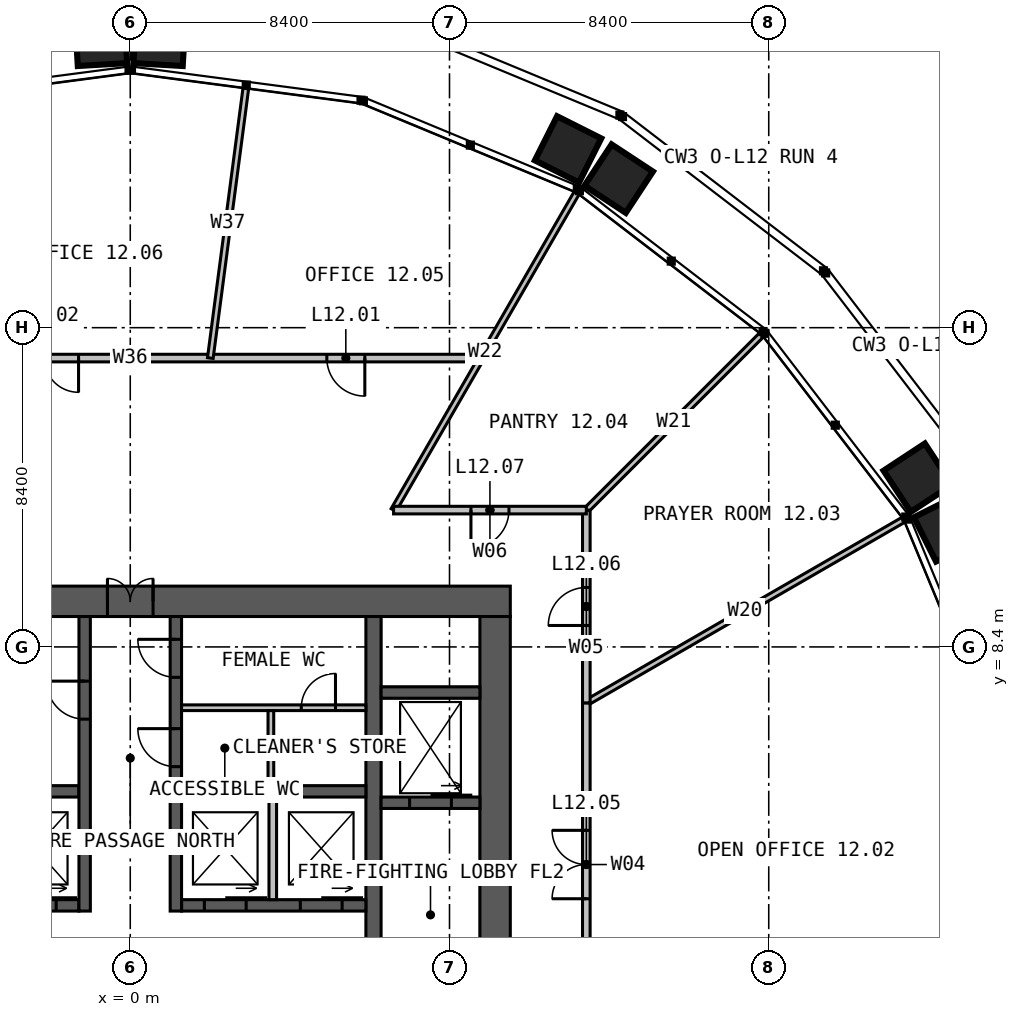
"""IFC4 building model, lengths in metres.
Left out: names, types, materials, properties, quantities, classifications, styles, units other than length and angle.
Written with IfcOpenShell. Run it as: python <this file> out.ifc"""

import sys

from ifc_helpers import new_model, si_unit, direction, frame, frame_2d, origin, place, context, subcontext, project, spatial, rectangle, extrude, element, fill, save


model = new_model("IFC4")
c1 = context("Model", 3, precision=1e-05, world=origin(), true_north=direction((0.0, 1.0)))
c2 = subcontext(c1, "Body", "Model", "MODEL_VIEW")
j1 = project(units=[si_unit("LENGTHUNIT", "METRE"), si_unit("PLANEANGLEUNIT", "RADIAN")], contexts=[c1])
p1 = place(None, origin())
s1 = spatial("IfcSite", under=j1, at=p1, CompositionType="ELEMENT")
p2 = place(p1, origin())
s2 = spatial("IfcBuilding", under=s1, at=p2, CompositionType="ELEMENT")
p3 = place(p2, frame((0.0, 0.0, 53.0)))
s3 = spatial("IfcBuildingStorey", under=s2, at=p3, CompositionType="ELEMENT", Elevation=53.0)
p4 = place(p3, frame((-10.0, 9.6, 0.0), z_axis=(0.0, 0.0, 1.0), x_axis=(1.0, 0.0, 0.0)))
e1 = element("IfcWall", 1, at=p4, inside=s3, PredefinedType="SOLIDWALL", context=c2, shape_type="SweptSolid", body=[
    extrude(rectangle(XDim=20.0, YDim=0.8, at=frame_2d((10.0, 0.0))), origin(), (0.0, 0.0, 1.0), 4.0),
])
p5 = place(p4, frame((9.4, 0.0, 0.0)))
e2 = element("IfcOpeningElement", 2, at=p5, cuts=e1, PredefinedType="OPENING", context=c2, shape_type="SweptSolid", body=[
    extrude(rectangle(XDim=1.2, YDim=2.2, at=frame_2d((0.6, 1.1))), frame((0.0, 0.41, 0.0), z_axis=(0.0, -1.0, 0.0), x_axis=(1.0, 0.0, 0.0)), (0.0, 0.0, 1.0), 0.82),
])
p6 = place(p3, frame((9.6, -9.2, 0.0), z_axis=(0.0, 0.0, 1.0), x_axis=(0.0, 1.0, 0.0)))
e3 = element("IfcWall", 3, at=p6, inside=s3, PredefinedType="SOLIDWALL", context=c2, shape_type="SweptSolid", body=[
    extrude(rectangle(XDim=18.4, YDim=0.8, at=frame_2d((9.2, 0.0))), origin(), (0.0, 0.0, 1.0), 4.0),
])
p7 = place(p3, frame((6.4, 9.2, 0.0), z_axis=(0.0, 0.0, 1.0), x_axis=(0.0, -1.0, 0.0)))
e4 = element("IfcWall", 4, at=p7, inside=s3, PredefinedType="SOLIDWALL", context=c2, shape_type="SweptSolid", body=[
    extrude(rectangle(XDim=18.4, YDim=0.4, at=frame_2d((9.2, 0.0))), origin(), (0.0, 0.0, 1.0), 4.0),
])
p8 = place(p7, frame((8.7, 0.0, 0.0)))
e5 = element("IfcOpeningElement", 5, at=p8, cuts=e4, PredefinedType="OPENING", context=c2, shape_type="SweptSolid", body=[
    extrude(rectangle(XDim=1.0, YDim=2.2, at=frame_2d((0.5, 1.1))), frame((0.0, 0.21, 0.0), z_axis=(0.0, -1.0, 0.0), x_axis=(1.0, 0.0, 0.0)), (0.0, 0.0, 1.0), 0.42),
])
p9 = place(p3, frame((-6.2, 1.6, 0.0), z_axis=(0.0, 0.0, 1.0), x_axis=(1.0, 0.0, 0.0)))
e6 = element("IfcWall", 6, at=p9, inside=s3, PredefinedType="SOLIDWALL", context=c2, shape_type="SweptSolid", body=[
    extrude(rectangle(XDim=4.85, YDim=0.3, at=frame_2d((2.425, 0.0))), origin(), (0.0, 0.0, 1.0), 4.0),
])
p10 = place(p9, frame((0.625, 0.0, 0.0)))
e7 = element("IfcOpeningElement", 7, at=p10, cuts=e6, PredefinedType="OPENING", context=c2, shape_type="SweptSolid", body=[
    extrude(rectangle(XDim=1.1, YDim=2.2, at=frame_2d((0.55, 1.1))), frame((0.0, 0.16, 0.0), z_axis=(0.0, -1.0, 0.0), x_axis=(1.0, 0.0, 0.0)), (0.0, 0.0, 1.0), 0.32),
])
p11 = place(p9, frame((3.15, 0.0, 0.0)))
e8 = element("IfcOpeningElement", 8, at=p11, cuts=e6, PredefinedType="OPENING", context=c2, shape_type="SweptSolid", body=[
    extrude(rectangle(XDim=1.1, YDim=2.2, at=frame_2d((0.55, 1.1))), frame((0.0, 0.16, 0.0), z_axis=(0.0, -1.0, 0.0), x_axis=(1.0, 0.0, 0.0)), (0.0, 0.0, 1.0), 0.32),
])
p12 = place(p3, frame((1.35, 1.6, 0.0), z_axis=(0.0, 0.0, 1.0), x_axis=(1.0, 0.0, 0.0)))
e9 = element("IfcWall", 9, at=p12, inside=s3, PredefinedType="SOLIDWALL", context=c2, shape_type="SweptSolid", body=[
    extrude(rectangle(XDim=4.85, YDim=0.3, at=frame_2d((2.425, 0.0))), origin(), (0.0, 0.0, 1.0), 4.0),
])
p13 = place(p12, frame((0.6, 0.0, 0.0)))
e10 = element("IfcOpeningElement", 10, at=p13, cuts=e9, PredefinedType="OPENING", context=c2, shape_type="SweptSolid", body=[
    extrude(rectangle(XDim=1.1, YDim=2.2, at=frame_2d((0.55, 1.1))), frame((0.0, 0.16, 0.0), z_axis=(0.0, -1.0, 0.0), x_axis=(1.0, 0.0, 0.0)), (0.0, 0.0, 1.0), 0.32),
])
p14 = place(p12, frame((3.125, 0.0, 0.0)))
e11 = element("IfcOpeningElement", 11, at=p14, cuts=e9, PredefinedType="OPENING", context=c2, shape_type="SweptSolid", body=[
    extrude(rectangle(XDim=1.1, YDim=2.2, at=frame_2d((0.55, 1.1))), frame((0.0, 0.16, 0.0), z_axis=(0.0, -1.0, 0.0), x_axis=(1.0, 0.0, 0.0)), (0.0, 0.0, 1.0), 0.32),
])
for number, where, z_axis, x_axis in (
    (12, (-6.2, 4.6, 0.0), (0.0, 0.0, 1.0), (1.0, 0.0, 0.0)),
    (13, (1.35, 4.6, 0.0), (0.0, 0.0, 1.0), (1.0, 0.0, 0.0)),
):
    element("IfcWall", number, at=place(p3, frame(where, z_axis=z_axis, x_axis=x_axis)), inside=s3, PredefinedType="SOLIDWALL", context=c2, shape_type="SweptSolid", body=[
        extrude(rectangle(XDim=4.85, YDim=0.3, at=frame_2d((2.425, 0.0))), origin(), (0.0, 0.0, 1.0), 4.0),
    ])
p15 = place(p3, frame((-1.2, 1.45, 0.0), z_axis=(0.0, 0.0, 1.0), x_axis=(0.0, 1.0, 0.0)))
e14 = element("IfcWall", 14, at=p15, inside=s3, PredefinedType="SOLIDWALL", context=c2, shape_type="SweptSolid", body=[
    extrude(rectangle(XDim=7.75, YDim=0.3, at=frame_2d((3.875, 0.0))), origin(), (0.0, 0.0, 1.0), 4.0),
])
p16 = place(p15, frame((5.05, 0.0, 0.0)))
e15 = element("IfcOpeningElement", 15, at=p16, cuts=e14, PredefinedType="OPENING", context=c2, shape_type="SweptSolid", body=[
    extrude(rectangle(XDim=1.0, YDim=2.2, at=frame_2d((0.5, 1.1))), frame((0.0, 0.16, 0.0), z_axis=(0.0, -1.0, 0.0), x_axis=(1.0, 0.0, 0.0)), (0.0, 0.0, 1.0), 0.32),
])
p17 = place(p3, frame((1.2, 1.45, 0.0), z_axis=(0.0, 0.0, 1.0), x_axis=(0.0, 1.0, 0.0)))
e16 = element("IfcWall", 16, at=p17, inside=s3, PredefinedType="SOLIDWALL", context=c2, shape_type="SweptSolid", body=[
    extrude(rectangle(XDim=7.75, YDim=0.3, at=frame_2d((3.875, 0.0))), origin(), (0.0, 0.0, 1.0), 4.0),
])
p18 = place(p17, frame((3.8, 0.0, 0.0)))
e17 = element("IfcOpeningElement", 17, at=p18, cuts=e16, PredefinedType="OPENING", context=c2, shape_type="SweptSolid", body=[
    extrude(rectangle(XDim=1.0, YDim=2.2, at=frame_2d((0.5, 1.1))), frame((0.0, 0.16, 0.0), z_axis=(0.0, -1.0, 0.0), x_axis=(1.0, 0.0, 0.0)), (0.0, 0.0, 1.0), 0.32),
])
p19 = place(p17, frame((6.15, 0.0, 0.0)))
e18 = element("IfcOpeningElement", 18, at=p19, cuts=e16, PredefinedType="OPENING", context=c2, shape_type="SweptSolid", body=[
    extrude(rectangle(XDim=1.0, YDim=2.2, at=frame_2d((0.5, 1.1))), frame((0.0, 0.16, 0.0), z_axis=(0.0, -1.0, 0.0), x_axis=(1.0, 0.0, 0.0)), (0.0, 0.0, 1.0), 0.32),
])
p20 = place(p3, frame((6.6, 4.3, 0.0), z_axis=(0.0, 0.0, 1.0), x_axis=(1.0, 0.0, 0.0)))
e19 = element("IfcWall", 19, at=p20, inside=s3, PredefinedType="SOLIDWALL", context=c2, shape_type="SweptSolid", body=[
    extrude(rectangle(XDim=2.6, YDim=0.3, at=frame_2d((1.3, 0.0))), origin(), (0.0, 0.0, 1.0), 4.0),
])
p21 = place(p20, frame((0.75, 0.0, 0.0)))
e20 = element("IfcOpeningElement", 20, at=p21, cuts=e19, PredefinedType="OPENING", context=c2, shape_type="SweptSolid", body=[
    extrude(rectangle(XDim=1.1, YDim=2.2, at=frame_2d((0.55, 1.1))), frame((0.0, 0.16, 0.0), z_axis=(0.0, -1.0, 0.0), x_axis=(1.0, 0.0, 0.0)), (0.0, 0.0, 1.0), 0.32),
])
p22 = place(p3, frame((6.6, 7.2, 0.0), z_axis=(0.0, 0.0, 1.0), x_axis=(1.0, 0.0, 0.0)))
e21 = element("IfcWall", 21, at=p22, inside=s3, PredefinedType="SOLIDWALL", context=c2, shape_type="SweptSolid", body=[
    extrude(rectangle(XDim=2.6, YDim=0.3, at=frame_2d((1.3, 0.0))), origin(), (0.0, 0.0, 1.0), 4.0),
])
p23 = place(p3, frame((3.75, 1.75, 0.0), z_axis=(0.0, 0.0, 1.0), x_axis=(0.0, 1.0, 0.0)))
e22 = element("IfcWall", 22, at=p23, inside=s3, PredefinedType="SOLIDWALL", context=c2, shape_type="SweptSolid", body=[
    extrude(rectangle(XDim=2.7, YDim=0.2, at=frame_2d((1.35, 0.0))), origin(), (0.0, 0.0, 1.0), 3.75),
])
p24 = place(p3, frame((1.35, 6.8, 0.0), z_axis=(0.0, 0.0, 1.0), x_axis=(1.0, 0.0, 0.0)))
e23 = element("IfcWall", 23, at=p24, inside=s3, PredefinedType="PARTITIONING", context=c2, shape_type="SweptSolid", body=[
    extrude(rectangle(XDim=4.85, YDim=0.15, at=frame_2d((2.425, 0.0))), origin(), (0.0, 0.0, 1.0), 3.75),
])
p25 = place(p24, frame((3.15, 0.0, 0.0)))
e24 = element("IfcOpeningElement", 24, at=p25, cuts=e23, PredefinedType="OPENING", context=c2, shape_type="SweptSolid", body=[
    extrude(rectangle(XDim=0.9, YDim=2.2, at=frame_2d((0.45, 1.1))), frame((0.0, 0.085, 0.0), z_axis=(0.0, -1.0, 0.0), x_axis=(1.0, 0.0, 0.0)), (0.0, 0.0, 1.0), 0.17),
])
p26 = place(p3, frame((3.7, 4.75, 0.0), z_axis=(0.0, 0.0, 1.0), x_axis=(0.0, 1.0, 0.0)))
e25 = element("IfcWall", 25, at=p26, inside=s3, PredefinedType="PARTITIONING", context=c2, shape_type="SweptSolid", body=[
    extrude(rectangle(XDim=1.975, YDim=0.15, at=frame_2d((0.988, 0.0))), origin(), (0.0, 0.0, 1.0), 3.75),
])
p27 = place(p3, frame((12.0, 6.928, 0.0), z_axis=(0.0, 0.0, 1.0), x_axis=(0.866030350715, 0.499991431567, 0.0)))
e26 = element("IfcWall", 26, at=p27, inside=s3, PredefinedType="PARTITIONING", context=c2, shape_type="SweptSolid", body=[
    extrude(rectangle(XDim=9.638, YDim=0.15, at=frame_2d((4.819, 0.0))), origin(), (0.0, 0.0, 1.0), 2.79),
])
p28 = place(p3, frame((12.0, 12.0, 0.0), z_axis=(0.0, 0.0, 1.0), x_axis=(0.707106781187, 0.707106781187, 0.0)))
e27 = element("IfcWall", 27, at=p28, inside=s3, PredefinedType="PARTITIONING", context=c2, shape_type="SweptSolid", body=[
    extrude(rectangle(XDim=6.524, YDim=0.15, at=frame_2d((3.262, 0.0))), origin(), (0.0, 0.0, 1.0), 2.79),
])
p29 = place(p3, frame((6.928, 12.0, 0.0), z_axis=(0.0, 0.0, 1.0), x_axis=(0.499991431567, 0.866030350715, 0.0)))
e28 = element("IfcWall", 28, at=p29, inside=s3, PredefinedType="PARTITIONING", context=c2, shape_type="SweptSolid", body=[
    extrude(rectangle(XDim=9.638, YDim=0.15, at=frame_2d((4.819, 0.0))), origin(), (0.0, 0.0, 1.0), 2.79),
])
p30 = place(p3, frame((12.0, -1.58, 0.0), z_axis=(0.0, 0.0, 1.0), x_axis=(0.0, 1.0, 0.0)))
e29 = element("IfcWall", 29, at=p30, inside=s3, PredefinedType="PARTITIONING", context=c2, shape_type="SweptSolid", body=[
    extrude(rectangle(XDim=8.508, YDim=0.2, at=frame_2d((4.254, 0.0))), origin(), (0.0, 0.0, 1.0), 3.8),
])
p31 = place(p30, frame((3.354, 0.0, 0.0)))
e30 = element("IfcOpeningElement", 30, at=p31, cuts=e29, PredefinedType="OPENING", context=c2, shape_type="SweptSolid", body=[
    extrude(rectangle(XDim=1.8, YDim=2.2, at=frame_2d((0.9, 1.1))), frame((0.0, 0.11, 0.0), z_axis=(0.0, -1.0, 0.0), x_axis=(1.0, 0.0, 0.0)), (0.0, 0.0, 1.0), 0.22),
])
p32 = place(p3, frame((12.0, 6.928, 0.0), z_axis=(0.0, 0.0, 1.0), x_axis=(0.0, 1.0, 0.0)))
e31 = element("IfcWall", 31, at=p32, inside=s3, PredefinedType="PARTITIONING", context=c2, shape_type="SweptSolid", body=[
    extrude(rectangle(XDim=5.072, YDim=0.2, at=frame_2d((2.536, 0.0))), origin(), (0.0, 0.0, 1.0), 3.8),
])
p33 = place(p32, frame((2.036, 0.0, 0.0)))
e32 = element("IfcOpeningElement", 32, at=p33, cuts=e31, PredefinedType="OPENING", context=c2, shape_type="SweptSolid", body=[
    extrude(rectangle(XDim=1.0, YDim=2.2, at=frame_2d((0.5, 1.1))), frame((0.0, 0.11, 0.0), z_axis=(0.0, -1.0, 0.0), x_axis=(1.0, 0.0, 0.0)), (0.0, 0.0, 1.0), 0.22),
])
p34 = place(p3, frame((12.0, 12.0, 0.0), z_axis=(0.0, 0.0, 1.0), x_axis=(-1.0, 0.0, 0.0)))
e33 = element("IfcWall", 33, at=p34, inside=s3, PredefinedType="PARTITIONING", context=c2, shape_type="SweptSolid", body=[
    extrude(rectangle(XDim=5.072, YDim=0.2, at=frame_2d((2.536, 0.0))), origin(), (0.0, 0.0, 1.0), 3.8),
])
p35 = place(p34, frame((2.036, 0.0, 0.0)))
e34 = element("IfcOpeningElement", 34, at=p35, cuts=e33, PredefinedType="OPENING", context=c2, shape_type="SweptSolid", body=[
    extrude(rectangle(XDim=1.0, YDim=2.2, at=frame_2d((0.5, 1.1))), frame((0.0, 0.11, 0.0), z_axis=(0.0, -1.0, 0.0), x_axis=(1.0, 0.0, 0.0)), (0.0, 0.0, 1.0), 0.22),
])
p36 = place(p3, frame((9.238, 16.0, 0.0), z_axis=(0.0, 0.0, 1.0), x_axis=(-1.0, 0.0, 0.0)))
e35 = element("IfcWall", 35, at=p36, inside=s3, PredefinedType="PARTITIONING", context=c2, shape_type="SweptSolid", body=[
    extrude(rectangle(XDim=18.475, YDim=0.2, at=frame_2d((9.238, 0.0))), origin(), (0.0, 0.0, 1.0), 3.8),
])
p37 = place(p36, frame((3.066, 0.0, 0.0)))
e36 = element("IfcOpeningElement", 36, at=p37, cuts=e35, PredefinedType="OPENING", context=c2, shape_type="SweptSolid", body=[
    extrude(rectangle(XDim=1.0, YDim=2.2, at=frame_2d((0.5, 1.1))), frame((0.0, 0.11, 0.0), z_axis=(0.0, -1.0, 0.0), x_axis=(1.0, 0.0, 0.0)), (0.0, 0.0, 1.0), 0.22),
])
p38 = place(p36, frame((10.598, 0.0, 0.0)))
e37 = element("IfcOpeningElement", 37, at=p38, cuts=e35, PredefinedType="OPENING", context=c2, shape_type="SweptSolid", body=[
    extrude(rectangle(XDim=1.8, YDim=2.2, at=frame_2d((0.9, 1.1))), frame((0.0, 0.11, 0.0), z_axis=(0.0, -1.0, 0.0), x_axis=(1.0, 0.0, 0.0)), (0.0, 0.0, 1.0), 0.22),
])
p39 = place(p36, frame((16.67, 0.0, 0.0)))
e38 = element("IfcOpeningElement", 38, at=p39, cuts=e35, PredefinedType="OPENING", context=c2, shape_type="SweptSolid", body=[
    extrude(rectangle(XDim=1.0, YDim=2.2, at=frame_2d((0.5, 1.1))), frame((0.0, 0.11, 0.0), z_axis=(0.0, -1.0, 0.0), x_axis=(1.0, 0.0, 0.0)), (0.0, 0.0, 1.0), 0.22),
])
p40 = place(p3, frame((2.106, 16.0, 0.0), z_axis=(0.0, 0.0, 1.0), x_axis=(0.130511883532, 0.991446745043, 0.0)))
e39 = element("IfcWall", 39, at=p40, inside=s3, PredefinedType="PARTITIONING", context=c2, shape_type="SweptSolid", body=[
    extrude(rectangle(XDim=7.155, YDim=0.15, at=frame_2d((3.578, 0.0))), origin(), (0.0, 0.0, 1.0), 2.79),
])
p41 = place(p5, origin())
e40 = element("IfcDoor", 40, at=p41, inside=s3, OperationType="DOUBLE_DOOR_SINGLE_SWING", PredefinedType="DOOR", context=c2, shape_type="SweptSolid", body=[
    extrude(rectangle(XDim=1.2, YDim=2.2, at=frame_2d((0.6, 1.1))), frame((0.0, 0.025, 0.0), z_axis=(0.0, -1.0, 0.0), x_axis=(1.0, 0.0, 0.0)), (0.0, 0.0, 1.0), 0.05),
])
fill(e2, e40)
p42 = place(p16, origin())
e41 = element("IfcDoor", 41, at=p42, inside=s3, OperationType="SINGLE_SWING_RIGHT", PredefinedType="DOOR", context=c2, shape_type="SweptSolid", body=[
    extrude(rectangle(XDim=1.0, YDim=2.2, at=frame_2d((0.5, 1.1))), frame((0.0, 0.025, 0.0), z_axis=(0.0, -1.0, 0.0), x_axis=(1.0, 0.0, 0.0)), (0.0, 0.0, 1.0), 0.05),
])
fill(e15, e41)
p43 = place(p18, origin())
e42 = element("IfcDoor", 42, at=p43, inside=s3, OperationType="SINGLE_SWING_RIGHT", PredefinedType="DOOR", context=c2, shape_type="SweptSolid", body=[
    extrude(rectangle(XDim=1.0, YDim=2.2, at=frame_2d((0.5, 1.1))), frame((0.0, 0.025, 0.0), z_axis=(0.0, -1.0, 0.0), x_axis=(1.0, 0.0, 0.0)), (0.0, 0.0, 1.0), 0.05),
])
fill(e17, e42)
p44 = place(p19, origin())
e43 = element("IfcDoor", 43, at=p44, inside=s3, OperationType="SINGLE_SWING_RIGHT", PredefinedType="DOOR", context=c2, shape_type="SweptSolid", body=[
    extrude(rectangle(XDim=1.0, YDim=2.2, at=frame_2d((0.5, 1.1))), frame((0.0, 0.025, 0.0), z_axis=(0.0, -1.0, 0.0), x_axis=(1.0, 0.0, 0.0)), (0.0, 0.0, 1.0), 0.05),
])
fill(e18, e43)
p45 = place(p25, origin())
e44 = element("IfcDoor", 44, at=p45, inside=s3, OperationType="SINGLE_SWING_RIGHT", PredefinedType="DOOR", context=c2, shape_type="SweptSolid", body=[
    extrude(rectangle(XDim=0.9, YDim=2.2, at=frame_2d((0.45, 1.1))), frame((0.0, 0.025, 0.0), z_axis=(0.0, -1.0, 0.0), x_axis=(1.0, 0.0, 0.0)), (0.0, 0.0, 1.0), 0.05),
])
fill(e24, e44)
p46 = place(p11, origin())
e45 = element("IfcDoor", 45, at=p46, inside=s3, OperationType="SLIDING_TO_LEFT", PredefinedType="DOOR", context=c2, shape_type="SweptSolid", body=[
    extrude(rectangle(XDim=1.1, YDim=2.2, at=frame_2d((0.55, 1.1))), frame((0.0, 0.025, 0.0), z_axis=(0.0, -1.0, 0.0), x_axis=(1.0, 0.0, 0.0)), (0.0, 0.0, 1.0), 0.05),
])
fill(e8, e45)
p47 = place(p13, origin())
e46 = element("IfcDoor", 46, at=p47, inside=s3, OperationType="SLIDING_TO_LEFT", PredefinedType="DOOR", context=c2, shape_type="SweptSolid", body=[
    extrude(rectangle(XDim=1.1, YDim=2.2, at=frame_2d((0.55, 1.1))), frame((0.0, 0.025, 0.0), z_axis=(0.0, -1.0, 0.0), x_axis=(1.0, 0.0, 0.0)), (0.0, 0.0, 1.0), 0.05),
])
fill(e10, e46)
p48 = place(p14, origin())
e47 = element("IfcDoor", 47, at=p48, inside=s3, OperationType="SLIDING_TO_LEFT", PredefinedType="DOOR", context=c2, shape_type="SweptSolid", body=[
    extrude(rectangle(XDim=1.1, YDim=2.2, at=frame_2d((0.55, 1.1))), frame((0.0, 0.025, 0.0), z_axis=(0.0, -1.0, 0.0), x_axis=(1.0, 0.0, 0.0)), (0.0, 0.0, 1.0), 0.05),
])
fill(e11, e47)
p49 = place(p21, origin())
e48 = element("IfcDoor", 48, at=p49, inside=s3, OperationType="SLIDING_TO_LEFT", PredefinedType="DOOR", context=c2, shape_type="SweptSolid", body=[
    extrude(rectangle(XDim=1.1, YDim=2.2, at=frame_2d((0.55, 1.1))), frame((0.0, 0.025, 0.0), z_axis=(0.0, -1.0, 0.0), x_axis=(1.0, 0.0, 0.0)), (0.0, 0.0, 1.0), 0.05),
])
fill(e20, e48)
p50 = place(p31, origin())
e49 = element("IfcDoor", 49, at=p50, inside=s3, OperationType="DOUBLE_DOOR_SINGLE_SWING", PredefinedType="DOOR", context=c2, shape_type="SweptSolid", body=[
    extrude(rectangle(XDim=1.8, YDim=2.2, at=frame_2d((0.9, 1.1))), frame((0.0, 0.025, 0.0), z_axis=(0.0, -1.0, 0.0), x_axis=(1.0, 0.0, 0.0)), (0.0, 0.0, 1.0), 0.05),
])
fill(e30, e49)
p51 = place(p33, origin())
e50 = element("IfcDoor", 50, at=p51, inside=s3, OperationType="SINGLE_SWING_LEFT", PredefinedType="DOOR", context=c2, shape_type="SweptSolid", body=[
    extrude(rectangle(XDim=1.0, YDim=2.2, at=frame_2d((0.5, 1.1))), frame((0.0, 0.025, 0.0), z_axis=(0.0, -1.0, 0.0), x_axis=(1.0, 0.0, 0.0)), (0.0, 0.0, 1.0), 0.05),
])
fill(e32, e50)
p52 = place(p35, origin())
e51 = element("IfcDoor", 51, at=p52, inside=s3, OperationType="SINGLE_SWING_RIGHT", PredefinedType="DOOR", context=c2, shape_type="SweptSolid", body=[
    extrude(rectangle(XDim=1.0, YDim=2.2, at=frame_2d((0.5, 1.1))), frame((0.0, 0.025, 0.0), z_axis=(0.0, -1.0, 0.0), x_axis=(1.0, 0.0, 0.0)), (0.0, 0.0, 1.0), 0.05),
])
fill(e34, e51)
p53 = place(p37, origin())
e52 = element("IfcDoor", 52, at=p53, inside=s3, OperationType="SINGLE_SWING_LEFT", PredefinedType="DOOR", context=c2, shape_type="SweptSolid", body=[
    extrude(rectangle(XDim=1.0, YDim=2.2, at=frame_2d((0.5, 1.1))), frame((0.0, 0.025, 0.0), z_axis=(0.0, -1.0, 0.0), x_axis=(1.0, 0.0, 0.0)), (0.0, 0.0, 1.0), 0.05),
])
fill(e36, e52)
p54 = place(p38, origin())
e53 = element("IfcDoor", 53, at=p54, inside=s3, OperationType="DOUBLE_DOOR_SINGLE_SWING", PredefinedType="DOOR", context=c2, shape_type="SweptSolid", body=[
    extrude(rectangle(XDim=1.8, YDim=2.2, at=frame_2d((0.9, 1.1))), frame((0.0, 0.025, 0.0), z_axis=(0.0, -1.0, 0.0), x_axis=(1.0, 0.0, 0.0)), (0.0, 0.0, 1.0), 0.05),
])
fill(e37, e53)
save(model, sys.argv[1])
